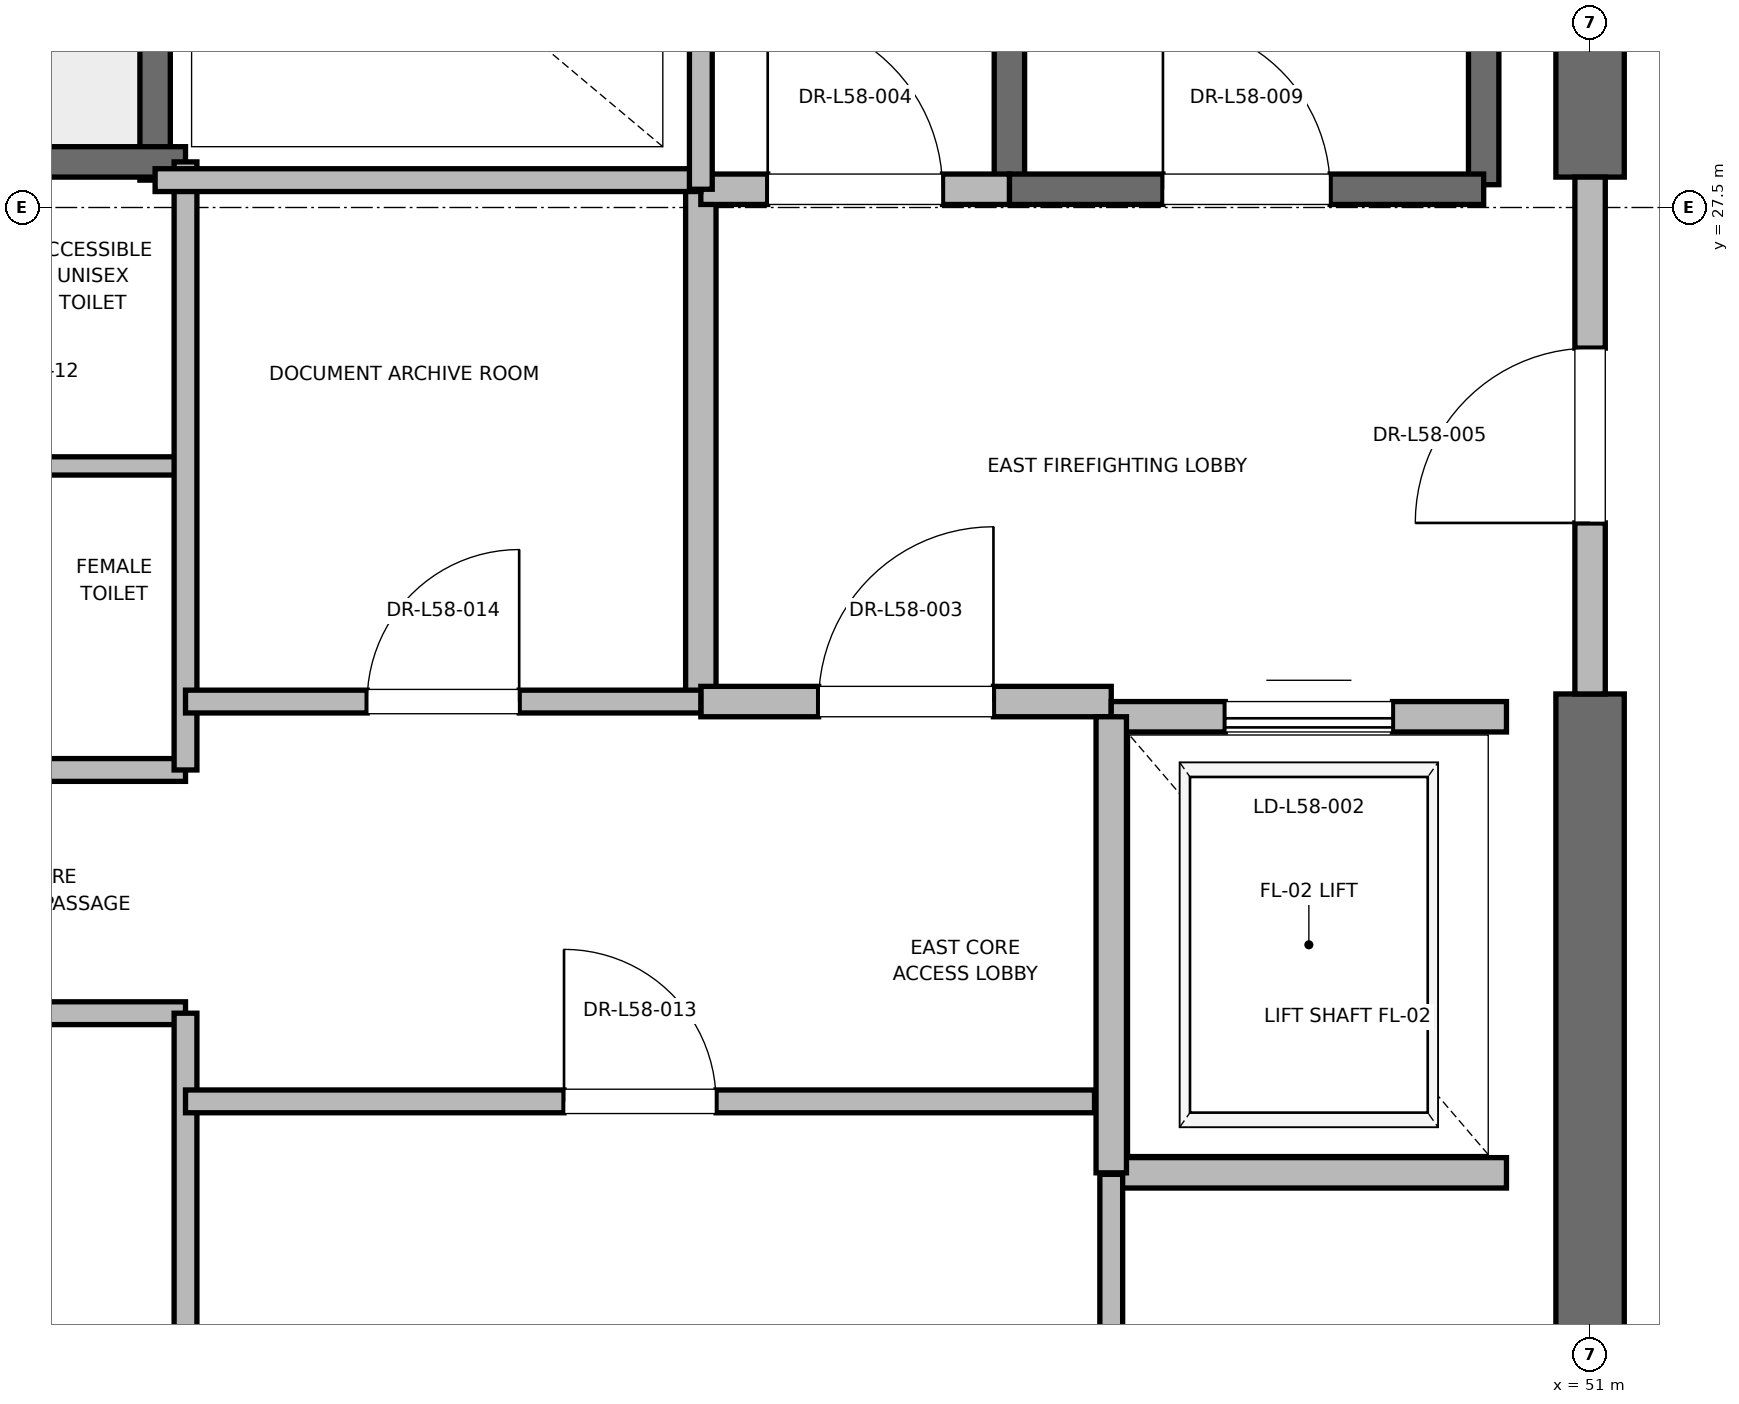
"""IFC4 building model, lengths in metres.
Left out: names, types, materials, properties, quantities, classifications, styles, units other than length and angle.
Written with IfcOpenShell. Run it as: python <this file> out.ifc"""

import sys

from ifc_helpers import new_model, si_unit, direction, frame, frame_2d, origin, place, context, subcontext, project, spatial, rectangle, extrude, element, fill, save


model = new_model("IFC4")
c1 = context("Model", 3, precision=1e-05, world=origin(), true_north=direction((0.0, 1.0)))
c2 = subcontext(c1, "Body", "Model", "MODEL_VIEW")
j1 = project(units=[si_unit("LENGTHUNIT", "METRE"), si_unit("PLANEANGLEUNIT", "RADIAN")], contexts=[c1])
p1 = place(None, origin())
s1 = spatial("IfcSite", under=j1, at=p1, CompositionType="ELEMENT")
p2 = place(p1, origin())
s2 = spatial("IfcBuilding", under=s1, at=p2, CompositionType="ELEMENT")
p3 = place(p2, frame((0.0, 0.0, 251.2)))
s3 = spatial("IfcBuildingStorey", under=s2, at=p3, CompositionType="ELEMENT", Elevation=251.2)
p4 = place(p3, frame((51.0, 18.5, 0.0), z_axis=(0.0, 0.0, 1.0), x_axis=(0.0, 1.0, 0.0)))
e1 = element("IfcWall", 1, at=p4, inside=s3, PredefinedType="SHEAR", context=c2, shape_type="SweptSolid", body=[
    extrude(rectangle(XDim=5.8, YDim=0.45, at=frame_2d((2.9, 0.0))), origin(), (0.0, 0.0, 1.0), 3.785),
])
p5 = place(p3, frame((51.0, 27.7, 0.0), z_axis=(0.0, 0.0, 1.0), x_axis=(0.0, 1.0, 0.0)))
e2 = element("IfcWall", 2, at=p5, inside=s3, PredefinedType="SHEAR", context=c2, shape_type="SweptSolid", body=[
    extrude(rectangle(XDim=8.8, YDim=0.45, at=frame_2d((4.4, 0.0))), origin(), (0.0, 0.0, 1.0), 3.785),
])
p6 = place(p3, frame((50.3, 27.65, 0.0), z_axis=(0.0, 0.0, 1.0), x_axis=(0.0, 1.0, 0.0)))
e3 = element("IfcWall", 3, at=p6, inside=s3, PredefinedType="SOLIDWALL", context=c2, shape_type="SweptSolid", body=[
    extrude(rectangle(XDim=8.15, YDim=0.2, at=frame_2d((4.075, 0.0))), origin(), (0.0, 0.0, 1.0), 3.785),
])
p7 = place(p3, frame((47.18, 27.62, 0.0), z_axis=(0.0, 0.0, 1.0), x_axis=(0.0, 1.0, 0.0)))
e4 = element("IfcWall", 4, at=p7, inside=s3, PredefinedType="SOLIDWALL", context=c2, shape_type="SweptSolid", body=[
    extrude(rectangle(XDim=8.18, YDim=0.2, at=frame_2d((4.09, 0.0))), origin(), (0.0, 0.0, 1.0), 3.785),
])
p8 = place(p3, frame((47.18, 27.62, 0.0), z_axis=(0.0, 0.0, 1.0), x_axis=(1.0, 0.0, 0.0)))
e5 = element("IfcWall", 5, at=p8, inside=s3, PredefinedType="SOLIDWALL", context=c2, shape_type="SweptSolid", body=[
    extrude(rectangle(XDim=3.12, YDim=0.2, at=frame_2d((1.56, 0.0))), origin(), (0.0, 0.0, 1.0), 3.785),
])
p9 = place(p8, frame((1.01, 0.0, 0.0)))
e6 = element("IfcOpeningElement", 6, at=p9, cuts=e5, PredefinedType="OPENING", context=c2, shape_type="SweptSolid", body=[
    extrude(rectangle(XDim=1.1, YDim=2.15, at=frame_2d((0.55, 1.075))), frame((0.0, 0.1, 0.0), z_axis=(0.0, -1.0, 0.0), x_axis=(1.0, 0.0, 0.0)), (0.0, 0.0, 1.0), 0.2),
])
p10 = place(p3, frame((41.56, 27.68, 0.0), z_axis=(0.0, 0.0, 1.0), x_axis=(0.0, 1.0, 0.0)))
e7 = element("IfcWall", 7, at=p10, inside=s3, PredefinedType="SOLIDWALL", context=c2, shape_type="SweptSolid", body=[
    extrude(rectangle(XDim=8.57, YDim=0.2, at=frame_2d((4.285, 0.0))), origin(), (0.0, 0.0, 1.0), 3.785),
])
p11 = place(p3, frame((38.44, 27.8, 0.0), z_axis=(0.0, 0.0, 1.0), x_axis=(1.0, 0.0, 0.0)))
e8 = element("IfcWall", 8, at=p11, inside=s3, PredefinedType="SOLIDWALL", context=c2, shape_type="SweptSolid", body=[
    extrude(rectangle(XDim=3.32, YDim=0.2, at=frame_2d((1.66, 0.0))), origin(), (0.0, 0.0, 1.0), 3.785),
])
p12 = place(p3, frame((45.15, 24.25, 0.0), z_axis=(0.0, 0.0, 1.0), x_axis=(0.0, 1.0, 0.0)))
e9 = element("IfcWall", 9, at=p12, inside=s3, PredefinedType="PARTITIONING", context=c2, shape_type="SweptSolid", body=[
    extrude(rectangle(XDim=3.37, YDim=0.2, at=frame_2d((1.685, 0.0))), origin(), (0.0, 0.0, 1.0), 3.785),
])
p13 = place(p3, frame((45.15, 24.25, 0.0), z_axis=(0.0, 0.0, 1.0), x_axis=(1.0, 0.0, 0.0)))
e10 = element("IfcWall", 10, at=p13, inside=s3, PredefinedType="PARTITIONING", context=c2, shape_type="SweptSolid", body=[
    extrude(rectangle(XDim=2.7, YDim=0.2, at=frame_2d((1.35, 0.0))), origin(), (0.0, 0.0, 1.0), 3.785),
])
p14 = place(p13, frame((0.775, 0.0, 0.0)))
e11 = element("IfcOpeningElement", 11, at=p14, cuts=e10, PredefinedType="OPENING", context=c2, shape_type="SweptSolid", body=[
    extrude(rectangle(XDim=1.15, YDim=2.2, at=frame_2d((0.575, 1.1))), frame((0.0, 0.1, 0.0), z_axis=(0.0, -1.0, 0.0), x_axis=(1.0, 0.0, 0.0)), (0.0, 0.0, 1.0), 0.2),
])
p15 = place(p3, frame((45.15, 27.62, 0.0), z_axis=(0.0, 0.0, 1.0), x_axis=(1.0, 0.0, 0.0)))
e12 = element("IfcWall", 12, at=p15, inside=s3, PredefinedType="PARTITIONING", context=c2, shape_type="SweptSolid", body=[
    extrude(rectangle(XDim=2.03, YDim=0.2, at=frame_2d((1.015, 0.0))), origin(), (0.0, 0.0, 1.0), 3.785),
])
p16 = place(p15, frame((0.44, 0.0, 0.0)))
e13 = element("IfcOpeningElement", 13, at=p16, cuts=e12, PredefinedType="OPENING", context=c2, shape_type="SweptSolid", body=[
    extrude(rectangle(XDim=1.15, YDim=2.2, at=frame_2d((0.575, 1.1))), frame((0.0, 0.1, 0.0), z_axis=(0.0, -1.0, 0.0), x_axis=(1.0, 0.0, 0.0)), (0.0, 0.0, 1.0), 0.2),
])
p17 = place(p3, frame((51.0, 24.3, 0.0), z_axis=(0.0, 0.0, 1.0), x_axis=(0.0, 1.0, 0.0)))
e14 = element("IfcWall", 14, at=p17, inside=s3, PredefinedType="PARTITIONING", context=c2, shape_type="SweptSolid", body=[
    extrude(rectangle(XDim=3.4, YDim=0.2, at=frame_2d((1.7, 0.0))), origin(), (0.0, 0.0, 1.0), 2.865),
])
p18 = place(p17, frame((1.125, 0.0, 0.0)))
e15 = element("IfcOpeningElement", 15, at=p18, cuts=e14, PredefinedType="OPENING", context=c2, shape_type="SweptSolid", body=[
    extrude(rectangle(XDim=1.15, YDim=2.2, at=frame_2d((0.575, 1.1))), frame((0.0, 0.1, 0.0), z_axis=(0.0, -1.0, 0.0), x_axis=(1.0, 0.0, 0.0)), (0.0, 0.0, 1.0), 0.2),
])
p19 = place(p3, frame((47.85, 21.15, 0.0), z_axis=(0.0, 0.0, 1.0), x_axis=(1.0, 0.0, 0.0)))
e16 = element("IfcWall", 16, at=p19, inside=s3, PredefinedType="SOLIDWALL", context=c2, shape_type="SweptSolid", body=[
    extrude(rectangle(XDim=2.6, YDim=0.2, at=frame_2d((1.3, 0.0))), origin(), (0.0, 0.0, 1.0), 3.785),
])
p20 = place(p3, frame((50.45, 24.15, 0.0), z_axis=(0.0, 0.0, 1.0), x_axis=(-1.0, 0.0, 0.0)))
e17 = element("IfcWall", 17, at=p20, inside=s3, PredefinedType="SOLIDWALL", context=c2, shape_type="SweptSolid", body=[
    extrude(rectangle(XDim=2.6, YDim=0.2, at=frame_2d((1.3, 0.0))), origin(), (0.0, 0.0, 1.0), 2.865),
])
p21 = place(p20, frame((0.75, 0.0, 0.0)))
e18 = element("IfcOpeningElement", 18, at=p21, cuts=e17, PredefinedType="OPENING", context=c2, shape_type="SweptSolid", body=[
    extrude(rectangle(XDim=1.1, YDim=2.2, at=frame_2d((0.55, 1.1))), frame((0.0, 0.1, 0.0), z_axis=(0.0, -1.0, 0.0), x_axis=(1.0, 0.0, 0.0)), (0.0, 0.0, 1.0), 0.2),
])
p22 = place(p3, frame((47.85, 24.15, 0.0), z_axis=(0.0, 0.0, 1.0), x_axis=(0.0, -1.0, 0.0)))
e19 = element("IfcWall", 19, at=p22, inside=s3, PredefinedType="SOLIDWALL", context=c2, shape_type="SweptSolid", body=[
    extrude(rectangle(XDim=3.0, YDim=0.2, at=frame_2d((1.5, 0.0))), origin(), (0.0, 0.0, 1.0), 3.785),
])
for number, where, z_axis, x_axis in (
    (20, (39.95, 22.2, 0.0), (0.0, 0.0, 1.0), (1.0, 0.0, 0.0)),
    (21, (39.95, 23.8, 0.0), (0.0, 0.0, 1.0), (1.0, 0.0, 0.0)),
):
    element("IfcWall", number, at=place(p3, frame(where, z_axis=z_axis, x_axis=x_axis)), inside=s3, PredefinedType="PARTITIONING", context=c2, shape_type="SweptSolid", body=[
        extrude(rectangle(XDim=1.81, YDim=0.15, at=frame_2d((0.905, 0.0))), origin(), (0.0, 0.0, 1.0), 2.85),
    ])
p23 = place(p3, frame((39.95, 25.8, 0.0), z_axis=(0.0, 0.0, 1.0), x_axis=(1.0, 0.0, 0.0)))
e22 = element("IfcWall", 22, at=p23, inside=s3, PredefinedType="PARTITIONING", context=c2, shape_type="SweptSolid", body=[
    extrude(rectangle(XDim=1.81, YDim=0.12, at=frame_2d((0.905, 0.0))), origin(), (0.0, 0.0, 1.0), 2.85),
])
p24 = place(p3, frame((41.76, 18.6, 0.0), z_axis=(0.0, 0.0, 1.0), x_axis=(0.0, 1.0, 0.0)))
e23 = element("IfcWall", 23, at=p24, inside=s3, PredefinedType="PARTITIONING", context=c2, shape_type="SweptSolid", body=[
    extrude(rectangle(XDim=3.6, YDim=0.15, at=frame_2d((1.8, 0.0))), origin(), (0.0, 0.0, 1.0), 2.85),
])
p25 = place(p3, frame((41.76, 23.8, 0.0), z_axis=(0.0, 0.0, 1.0), x_axis=(0.0, 1.0, 0.0)))
e24 = element("IfcWall", 24, at=p25, inside=s3, PredefinedType="PARTITIONING", context=c2, shape_type="SweptSolid", body=[
    extrude(rectangle(XDim=4.0, YDim=0.15, at=frame_2d((2.0, 0.0))), origin(), (0.0, 0.0, 1.0), 2.85),
])
p26 = place(p3, frame((41.56, 27.68, 0.0), z_axis=(0.0, 0.0, 1.0), x_axis=(1.0, 0.0, 0.0)))
e25 = element("IfcWall", 25, at=p26, inside=s3, PredefinedType="PARTITIONING", context=c2, shape_type="SweptSolid", body=[
    extrude(rectangle(XDim=3.59, YDim=0.15, at=frame_2d((1.795, 0.0))), origin(), (0.0, 0.0, 1.0), 2.85),
])
p27 = place(p3, frame((47.85, 18.6, 0.0), z_axis=(0.0, 0.0, 1.0), x_axis=(0.0, 1.0, 0.0)))
e26 = element("IfcWall", 26, at=p27, inside=s3, PredefinedType="PARTITIONING", context=c2, shape_type="SweptSolid", body=[
    extrude(rectangle(XDim=2.54, YDim=0.15, at=frame_2d((1.27, 0.0))), origin(), (0.0, 0.0, 1.0), 2.85),
])
p28 = place(p3, frame((41.76, 21.62, 0.0), z_axis=(0.0, 0.0, 1.0), x_axis=(1.0, 0.0, 0.0)))
e27 = element("IfcWall", 27, at=p28, inside=s3, PredefinedType="PARTITIONING", context=c2, shape_type="SweptSolid", body=[
    extrude(rectangle(XDim=5.98, YDim=0.15, at=frame_2d((2.99, 0.0))), origin(), (0.0, 0.0, 1.0), 2.85),
])
p29 = place(p28, frame((2.49, 0.0, 0.0)))
e28 = element("IfcOpeningElement", 28, at=p29, cuts=e27, PredefinedType="OPENING", context=c2, shape_type="SweptSolid", body=[
    extrude(rectangle(XDim=1.0, YDim=2.15, at=frame_2d((0.5, 1.075))), frame((0.0, 0.075, 0.0), z_axis=(0.0, -1.0, 0.0), x_axis=(1.0, 0.0, 0.0)), (0.0, 0.0, 1.0), 0.15),
])
p30 = place(p3, frame((41.76, 24.25, 0.0), z_axis=(0.0, 0.0, 1.0), x_axis=(1.0, 0.0, 0.0)))
e29 = element("IfcWall", 29, at=p30, inside=s3, PredefinedType="PARTITIONING", context=c2, shape_type="SweptSolid", body=[
    extrude(rectangle(XDim=3.39, YDim=0.15, at=frame_2d((1.695, 0.0))), origin(), (0.0, 0.0, 1.0), 2.85),
])
p31 = place(p30, frame((1.195, 0.0, 0.0)))
e30 = element("IfcOpeningElement", 30, at=p31, cuts=e29, PredefinedType="OPENING", context=c2, shape_type="SweptSolid", body=[
    extrude(rectangle(XDim=1.0, YDim=2.15, at=frame_2d((0.5, 1.075))), frame((0.0, 0.075, 0.0), z_axis=(0.0, -1.0, 0.0), x_axis=(1.0, 0.0, 0.0)), (0.0, 0.0, 1.0), 0.15),
])
p32 = place(p3, frame((45.15, 27.62, 0.0), z_axis=(0.0, 0.0, 1.0), x_axis=(0.0, 1.0, 0.0)))
e31 = element("IfcWall", 31, at=p32, inside=s3, PredefinedType="PARTITIONING", context=c2, shape_type="SweptSolid", body=[
    extrude(rectangle(XDim=3.1, YDim=0.15, at=frame_2d((1.55, 0.0))), origin(), (0.0, 0.0, 1.0), 2.85),
])
p33 = place(p9, origin())
e32 = element("IfcDoor", 32, at=p33, inside=s3, OperationType="SINGLE_SWING_LEFT", PredefinedType="DOOR", context=c2, shape_type="SweptSolid", body=[
    extrude(rectangle(XDim=1.1, YDim=2.15, at=frame_2d((0.55, 1.075))), frame((0.0, 0.025, 0.0), z_axis=(0.0, -1.0, 0.0), x_axis=(1.0, 0.0, 0.0)), (0.0, 0.0, 1.0), 0.05),
])
fill(e6, e32)
p34 = place(p14, origin())
e33 = element("IfcDoor", 33, at=p34, inside=s3, OperationType="SINGLE_SWING_RIGHT", PredefinedType="DOOR", context=c2, shape_type="SweptSolid", body=[
    extrude(rectangle(XDim=1.15, YDim=2.2, at=frame_2d((0.575, 1.1))), frame((0.0, 0.025, 0.0), z_axis=(0.0, -1.0, 0.0), x_axis=(1.0, 0.0, 0.0)), (0.0, 0.0, 1.0), 0.05),
])
fill(e11, e33)
p35 = place(p16, origin())
e34 = element("IfcDoor", 34, at=p35, inside=s3, OperationType="SINGLE_SWING_LEFT", PredefinedType="DOOR", context=c2, shape_type="SweptSolid", body=[
    extrude(rectangle(XDim=1.15, YDim=2.2, at=frame_2d((0.575, 1.1))), frame((0.0, 0.025, 0.0), z_axis=(0.0, -1.0, 0.0), x_axis=(1.0, 0.0, 0.0)), (0.0, 0.0, 1.0), 0.05),
])
fill(e13, e34)
p36 = place(p18, origin())
e35 = element("IfcDoor", 35, at=p36, inside=s3, OperationType="SINGLE_SWING_LEFT", PredefinedType="DOOR", context=c2, shape_type="SweptSolid", body=[
    extrude(rectangle(XDim=1.15, YDim=2.2, at=frame_2d((0.575, 1.1))), frame((0.0, 0.025, 0.0), z_axis=(0.0, -1.0, 0.0), x_axis=(1.0, 0.0, 0.0)), (0.0, 0.0, 1.0), 0.05),
])
fill(e15, e35)
p37 = place(p21, origin())
e36 = element("IfcDoor", 36, at=p37, inside=s3, OperationType="SLIDING_TO_RIGHT", PredefinedType="DOOR", context=c2, shape_type="SweptSolid", body=[
    extrude(rectangle(XDim=1.1, YDim=2.2, at=frame_2d((0.55, 1.1))), frame((0.0, 0.025, 0.0), z_axis=(0.0, -1.0, 0.0), x_axis=(1.0, 0.0, 0.0)), (0.0, 0.0, 1.0), 0.05),
])
fill(e18, e36)
p38 = place(p29, origin())
e37 = element("IfcDoor", 37, at=p38, inside=s3, OperationType="SINGLE_SWING_LEFT", PredefinedType="DOOR", context=c2, shape_type="SweptSolid", body=[
    extrude(rectangle(XDim=1.0, YDim=2.15, at=frame_2d((0.5, 1.075))), frame((0.0, 0.025, 0.0), z_axis=(0.0, -1.0, 0.0), x_axis=(1.0, 0.0, 0.0)), (0.0, 0.0, 1.0), 0.05),
])
fill(e28, e37)
p39 = place(p31, origin())
e38 = element("IfcDoor", 38, at=p39, inside=s3, OperationType="SINGLE_SWING_RIGHT", PredefinedType="DOOR", context=c2, shape_type="SweptSolid", body=[
    extrude(rectangle(XDim=1.0, YDim=2.15, at=frame_2d((0.5, 1.075))), frame((0.0, 0.025, 0.0), z_axis=(0.0, -1.0, 0.0), x_axis=(1.0, 0.0, 0.0)), (0.0, 0.0, 1.0), 0.05),
])
fill(e30, e38)
save(model, sys.argv[1])
